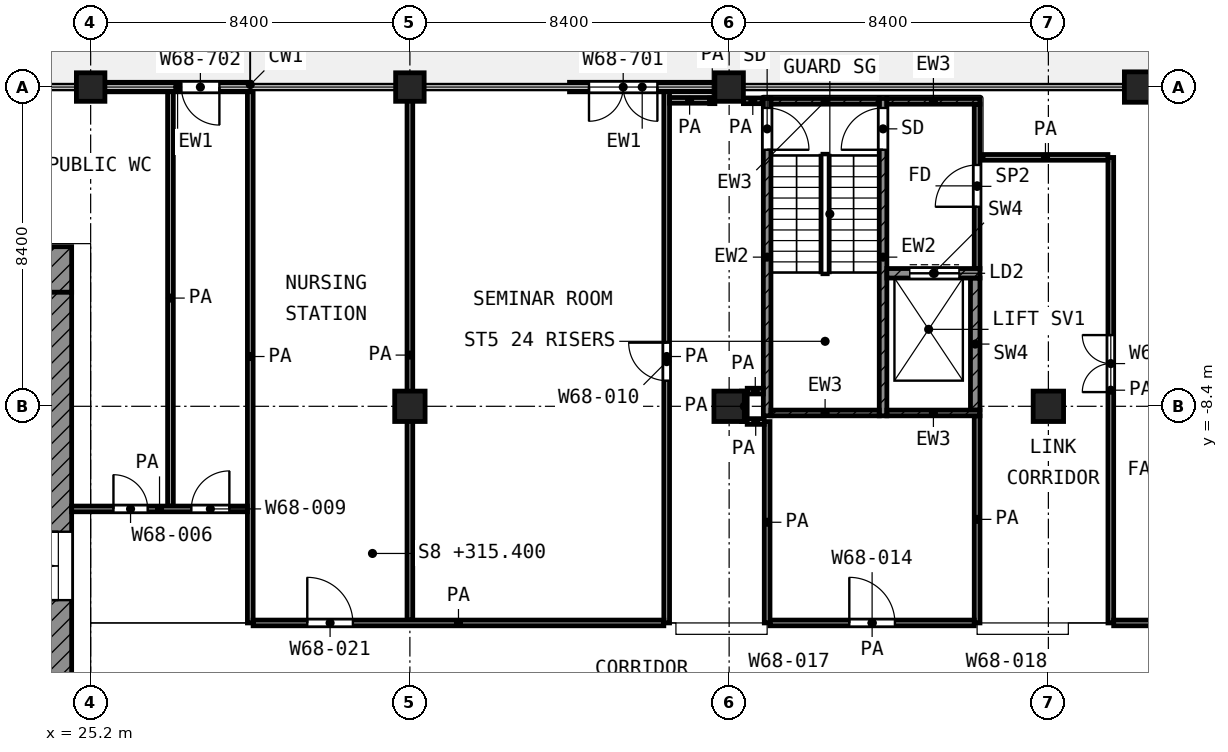
"""IFC4 building model, lengths in metres.
Left out: names, types, materials, properties, quantities, classifications, styles, units other than length and angle.
Written with IfcOpenShell. Run it as: python <this file> out.ifc"""

import sys

from ifc_helpers import new_model, si_unit, direction, frame, frame_2d, origin, origin_2d, place, context, subcontext, project, spatial, rectangle, extrude, element, fill, save


model = new_model("IFC4")
c1 = context("Model", 3, precision=1e-05, world=origin(), true_north=direction((0.0, 1.0)))
c2 = subcontext(c1, "Body", "Model", "MODEL_VIEW")
j1 = project(units=[si_unit("LENGTHUNIT", "METRE"), si_unit("PLANEANGLEUNIT", "RADIAN")], contexts=[c1])
p1 = place(None, origin())
s1 = spatial("IfcSite", under=j1, at=p1, CompositionType="ELEMENT")
p2 = place(p1, origin())
s2 = spatial("IfcBuilding", under=s1, at=p2, CompositionType="ELEMENT")
p3 = place(p2, frame((0.0, 0.0, 315.4)))
s3 = spatial("IfcBuildingStorey", under=s2, at=p3, CompositionType="ELEMENT", Elevation=315.4)
for number, where, z_axis, x_axis in (
    (1, (25.2, 0.0, 0.0), (0.0, 0.0, 1.0), (1.0, 0.0, 0.0)),
    (2, (33.6, 0.0, 0.0), (0.0, 0.0, 1.0), (1.0, 0.0, 0.0)),
    (3, (42.0, 0.0, 0.0), (0.0, 0.0, 1.0), (1.0, 0.0, 0.0)),
):
    element("IfcColumn", number, at=place(p3, frame(where, z_axis=z_axis, x_axis=x_axis)), inside=s3, PredefinedType="COLUMN", context=c2, shape_type="SweptSolid", body=[
        extrude(rectangle(XDim=0.75, YDim=0.75, at=origin_2d()), origin(), (0.0, 0.0, 1.0), 4.2),
    ])
for number, where, z_axis, x_axis in (
    (4, (52.8, 0.0, 0.0), (0.0, 0.0, 1.0), (1.0, 0.0, 0.0)),
    (5, (33.6, -8.4, 0.0), (0.0, 0.0, 1.0), (1.0, 0.0, 0.0)),
    (6, (42.0, -8.4, 0.0), (0.0, 0.0, 1.0), (1.0, 0.0, 0.0)),
    (7, (50.4, -8.4, 0.0), (0.0, 0.0, 1.0), (1.0, 0.0, 0.0)),
):
    element("IfcColumn", number, at=place(p3, frame(where, z_axis=z_axis, x_axis=x_axis)), inside=s3, PredefinedType="COLUMN", context=c2, shape_type="SweptSolid", body=[
        extrude(rectangle(XDim=0.8, YDim=0.8, at=origin_2d()), origin(), (0.0, 0.0, 1.0), 4.2),
    ])
p4 = place(p3, frame((41.625, 0.0, 0.0), z_axis=(0.0, 0.0, 1.0), x_axis=(-1.0, 0.0, 0.0)))
e8 = element("IfcWall", 8, at=p4, inside=s3, PredefinedType="SOLIDWALL", context=c2, shape_type="SweptSolid", body=[
    extrude(rectangle(XDim=3.825, YDim=0.25, at=frame_2d((1.913, 0.0))), origin(), (0.0, 0.0, 1.0), 3.48),
])
p5 = place(p4, frame((1.512, 0.0, 0.0)))
e9 = element("IfcOpeningElement", 9, at=p5, cuts=e8, PredefinedType="OPENING", context=c2, shape_type="SweptSolid", body=[
    extrude(rectangle(XDim=1.8, YDim=2.1, at=frame_2d((0.9, 1.05))), frame((0.0, 0.135, 0.0), z_axis=(0.0, -1.0, 0.0), x_axis=(1.0, 0.0, 0.0)), (0.0, 0.0, 1.0), 0.27),
])
p6 = place(p3, frame((29.4, 0.0, 0.0), z_axis=(0.0, 0.0, 1.0), x_axis=(-1.0, 0.0, 0.0)))
e10 = element("IfcWall", 10, at=p6, inside=s3, PredefinedType="SOLIDWALL", context=c2, shape_type="SweptSolid", body=[
    extrude(rectangle(XDim=3.825, YDim=0.25, at=frame_2d((1.913, 0.0))), origin(), (0.0, 0.0, 1.0), 3.48),
])
p7 = place(p6, frame((0.812, 0.0, 0.0)))
e11 = element("IfcOpeningElement", 11, at=p7, cuts=e10, PredefinedType="OPENING", context=c2, shape_type="SweptSolid", body=[
    extrude(rectangle(XDim=1.0, YDim=2.1, at=frame_2d((0.5, 1.05))), frame((0.0, 0.135, 0.0), z_axis=(0.0, -1.0, 0.0), x_axis=(1.0, 0.0, 0.0)), (0.0, 0.0, 1.0), 0.27),
])
p8 = place(p3, frame((4.2, -4.8, 0.0), z_axis=(0.0, 0.0, 1.0), x_axis=(1.0, 0.0, 0.0)))
e12 = element("IfcWall", 12, at=p8, inside=s3, PredefinedType="SHEAR", context=c2, shape_type="SweptSolid", body=[
    extrude(rectangle(XDim=20.5, YDim=1.2, at=frame_2d((10.25, 0.0))), origin(), (0.0, 0.0, 1.0), 3.6),
])
p9 = place(p8, frame((1.95, 0.0, 0.0)))
e13 = element("IfcOpeningElement", 13, at=p9, cuts=e12, PredefinedType="OPENING", context=c2, shape_type="SweptSolid", body=[
    extrude(rectangle(XDim=1.1, YDim=2.1, at=frame_2d((0.55, 1.05))), frame((0.0, 0.61, 0.0), z_axis=(0.0, -1.0, 0.0), x_axis=(1.0, 0.0, 0.0)), (0.0, 0.0, 1.0), 1.22),
])
p10 = place(p8, frame((17.95, 0.0, 0.0)))
e14 = element("IfcOpeningElement", 14, at=p10, cuts=e12, PredefinedType="OPENING", context=c2, shape_type="SweptSolid", body=[
    extrude(rectangle(XDim=1.1, YDim=2.1, at=frame_2d((0.55, 1.05))), frame((0.0, 0.61, 0.0), z_axis=(0.0, -1.0, 0.0), x_axis=(1.0, 0.0, 0.0)), (0.0, 0.0, 1.0), 1.22),
])
p11 = place(p3, frame((24.35, -24.0, 0.0), z_axis=(0.0, 0.0, 1.0), x_axis=(0.0, 1.0, 0.0)))
e15 = element("IfcWall", 15, at=p11, inside=s3, PredefinedType="SHEAR", context=c2, shape_type="SweptSolid", body=[
    extrude(rectangle(XDim=18.6, YDim=0.7, at=frame_2d((9.3, 0.0))), origin(), (0.0, 0.0, 1.0), 3.6),
])
p12 = place(p11, frame((10.5, 0.0, 0.0)))
e16 = element("IfcOpeningElement", 16, at=p12, cuts=e15, PredefinedType="OPENING", context=c2, shape_type="SweptSolid", body=[
    extrude(rectangle(XDim=1.8, YDim=2.1, at=frame_2d((0.9, 1.05))), frame((0.0, 0.36, 0.0), z_axis=(0.0, -1.0, 0.0), x_axis=(1.0, 0.0, 0.0)), (0.0, 0.0, 1.0), 0.72),
])
p13 = place(p3, frame((43.0, -8.65, 0.0), z_axis=(0.0, 0.0, 1.0), x_axis=(0.0, 1.0, 0.0)))
e17 = element("IfcWall", 17, at=p13, inside=s3, PredefinedType="SHEAR", context=c2, shape_type="SweptSolid", body=[
    extrude(rectangle(XDim=8.35, YDim=0.2, at=frame_2d((4.175, 0.0))), origin(), (0.0, 0.0, 1.0), 3.6),
])
p14 = place(p13, frame((7.0, 0.0, 0.0)))
e18 = element("IfcOpeningElement", 18, at=p14, cuts=e17, PredefinedType="OPENING", context=c2, shape_type="SweptSolid", body=[
    extrude(rectangle(XDim=1.1, YDim=2.1, at=frame_2d((0.55, 1.05))), frame((0.0, 0.11, 0.0), z_axis=(0.0, -1.0, 0.0), x_axis=(1.0, 0.0, 0.0)), (0.0, 0.0, 1.0), 0.22),
])
p15 = place(p3, frame((46.05, -8.65, 0.0), z_axis=(0.0, 0.0, 1.0), x_axis=(0.0, 1.0, 0.0)))
e19 = element("IfcWall", 19, at=p15, inside=s3, PredefinedType="SHEAR", context=c2, shape_type="SweptSolid", body=[
    extrude(rectangle(XDim=8.35, YDim=0.2, at=frame_2d((4.175, 0.0))), origin(), (0.0, 0.0, 1.0), 3.6),
])
p16 = place(p15, frame((7.0, 0.0, 0.0)))
e20 = element("IfcOpeningElement", 20, at=p16, cuts=e19, PredefinedType="OPENING", context=c2, shape_type="SweptSolid", body=[
    extrude(rectangle(XDim=1.1, YDim=2.1, at=frame_2d((0.55, 1.05))), frame((0.0, 0.11, 0.0), z_axis=(0.0, -1.0, 0.0), x_axis=(1.0, 0.0, 0.0)), (0.0, 0.0, 1.0), 0.22),
])
p17 = place(p3, frame((43.1, -0.375, 0.0), z_axis=(0.0, 0.0, 1.0), x_axis=(1.0, 0.0, 0.0)))
e21 = element("IfcWall", 21, at=p17, inside=s3, PredefinedType="SHEAR", context=c2, shape_type="SweptSolid", body=[
    extrude(rectangle(XDim=2.85, YDim=0.15, at=frame_2d((1.425, 0.0))), origin(), (0.0, 0.0, 1.0), 3.6),
])
p18 = place(p3, frame((46.15, -0.375, 0.0), z_axis=(0.0, 0.0, 1.0), x_axis=(1.0, 0.0, 0.0)))
e22 = element("IfcWall", 22, at=p18, inside=s3, PredefinedType="SHEAR", context=c2, shape_type="SweptSolid", body=[
    extrude(rectangle(XDim=2.45, YDim=0.15, at=frame_2d((1.225, 0.0))), origin(), (0.0, 0.0, 1.0), 3.6),
])
p19 = place(p3, frame((43.1, -8.575, 0.0), z_axis=(0.0, 0.0, 1.0), x_axis=(1.0, 0.0, 0.0)))
e23 = element("IfcWall", 23, at=p19, inside=s3, PredefinedType="SHEAR", context=c2, shape_type="SweptSolid", body=[
    extrude(rectangle(XDim=2.85, YDim=0.15, at=frame_2d((1.425, 0.0))), origin(), (0.0, 0.0, 1.0), 3.6),
])
p20 = place(p3, frame((46.15, -8.575, 0.0), z_axis=(0.0, 0.0, 1.0), x_axis=(1.0, 0.0, 0.0)))
e24 = element("IfcWall", 24, at=p20, inside=s3, PredefinedType="SHEAR", context=c2, shape_type="SweptSolid", body=[
    extrude(rectangle(XDim=2.45, YDim=0.15, at=frame_2d((1.225, 0.0))), origin(), (0.0, 0.0, 1.0), 3.6),
])
p21 = place(p3, frame((46.15, -4.9, 0.0), z_axis=(0.0, 0.0, 1.0), x_axis=(1.0, 0.0, 0.0)))
e25 = element("IfcWall", 25, at=p21, inside=s3, PredefinedType="SHEAR", context=c2, shape_type="SweptSolid", body=[
    extrude(rectangle(XDim=2.45, YDim=0.25, at=frame_2d((1.225, 0.0))), origin(), (0.0, 0.0, 1.0), 3.6),
])
p22 = place(p21, frame((0.6, 0.0, 0.0)))
e26 = element("IfcOpeningElement", 26, at=p22, cuts=e25, PredefinedType="OPENING", context=c2, shape_type="SweptSolid", body=[
    extrude(rectangle(XDim=1.3, YDim=2.1, at=frame_2d((0.65, 1.05))), frame((0.0, 0.135, 0.0), z_axis=(0.0, -1.0, 0.0), x_axis=(1.0, 0.0, 0.0)), (0.0, 0.0, 1.0), 0.27),
])
p23 = place(p3, frame((48.475, -8.5, 0.0), z_axis=(0.0, 0.0, 1.0), x_axis=(0.0, 1.0, 0.0)))
e27 = element("IfcWall", 27, at=p23, inside=s3, PredefinedType="SHEAR", context=c2, shape_type="SweptSolid", body=[
    extrude(rectangle(XDim=3.475, YDim=0.25, at=frame_2d((1.738, 0.0))), origin(), (0.0, 0.0, 1.0), 3.6),
])
p24 = place(p3, frame((48.525, -4.775, 0.0), z_axis=(0.0, 0.0, 1.0), x_axis=(0.0, 1.0, 0.0)))
e28 = element("IfcWall", 28, at=p24, inside=s3, PredefinedType="PARTITIONING", context=c2, shape_type="SweptSolid", body=[
    extrude(rectangle(XDim=4.325, YDim=0.15, at=frame_2d((2.163, 0.0))), origin(), (0.0, 0.0, 1.0), 3.6),
])
p25 = place(p24, frame((1.625, 0.0, 0.0)))
e29 = element("IfcOpeningElement", 29, at=p25, cuts=e28, PredefinedType="OPENING", context=c2, shape_type="SweptSolid", body=[
    extrude(rectangle(XDim=1.1, YDim=2.1, at=frame_2d((0.55, 1.05))), frame((0.0, 0.085, 0.0), z_axis=(0.0, -1.0, 0.0), x_axis=(1.0, 0.0, 0.0)), (0.0, 0.0, 1.0), 0.17),
])
p26 = place(p3, frame((29.475, -14.1, 0.0), z_axis=(0.0, 0.0, 1.0), x_axis=(1.0, 0.0, 0.0)))
e30 = element("IfcWall", 30, at=p26, inside=s3, PredefinedType="PARTITIONING", context=c2, shape_type="SweptSolid", body=[
    extrude(rectangle(XDim=10.807, YDim=0.15, at=frame_2d((5.403, 0.0))), origin(), (0.0, 0.0, 1.0), 3.6),
])
p27 = place(p26, frame((1.425, 0.0, 0.0)))
e31 = element("IfcOpeningElement", 31, at=p27, cuts=e30, PredefinedType="OPENING", context=c2, shape_type="SweptSolid", body=[
    extrude(rectangle(XDim=1.2, YDim=2.1, at=frame_2d((0.6, 1.05))), frame((0.0, 0.085, 0.0), z_axis=(0.0, -1.0, 0.0), x_axis=(1.0, 0.0, 0.0)), (0.0, 0.0, 1.0), 0.17),
])
p28 = place(p3, frame((43.075, -14.1, 0.0), z_axis=(0.0, 0.0, 1.0), x_axis=(1.0, 0.0, 0.0)))
e32 = element("IfcWall", 32, at=p28, inside=s3, PredefinedType="PARTITIONING", context=c2, shape_type="SweptSolid", body=[
    extrude(rectangle(XDim=5.375, YDim=0.15, at=frame_2d((2.688, 0.0))), origin(), (0.0, 0.0, 1.0), 3.6),
])
p29 = place(p28, frame((2.087, 0.0, 0.0)))
e33 = element("IfcOpeningElement", 33, at=p29, cuts=e32, PredefinedType="OPENING", context=c2, shape_type="SweptSolid", body=[
    extrude(rectangle(XDim=1.2, YDim=2.1, at=frame_2d((0.6, 1.05))), frame((0.0, 0.085, 0.0), z_axis=(0.0, -1.0, 0.0), x_axis=(1.0, 0.0, 0.0)), (0.0, 0.0, 1.0), 0.17),
])
p30 = place(p3, frame((52.118, -14.1, 0.0), z_axis=(0.0, 0.0, 1.0), x_axis=(1.0, 0.0, 0.0)))
e34 = element("IfcWall", 34, at=p30, inside=s3, PredefinedType="PARTITIONING", context=c2, shape_type="SweptSolid", body=[
    extrude(rectangle(XDim=6.602, YDim=0.15, at=frame_2d((3.301, 0.0))), origin(), (0.0, 0.0, 1.0), 3.6),
])
p31 = place(p3, frame((24.7, -11.1, 0.0), z_axis=(0.0, 0.0, 1.0), x_axis=(1.0, 0.0, 0.0)))
e35 = element("IfcWall", 35, at=p31, inside=s3, PredefinedType="PARTITIONING", context=c2, shape_type="SweptSolid", body=[
    extrude(rectangle(XDim=4.625, YDim=0.15, at=frame_2d((2.312, 0.0))), origin(), (0.0, 0.0, 1.0), 3.6),
])
p32 = place(p31, frame((1.1, 0.0, 0.0)))
e36 = element("IfcOpeningElement", 36, at=p32, cuts=e35, PredefinedType="OPENING", context=c2, shape_type="SweptSolid", body=[
    extrude(rectangle(XDim=0.9, YDim=2.1, at=frame_2d((0.45, 1.05))), frame((0.0, 0.085, 0.0), z_axis=(0.0, -1.0, 0.0), x_axis=(1.0, 0.0, 0.0)), (0.0, 0.0, 1.0), 0.17),
])
p33 = place(p31, frame((3.15, 0.0, 0.0)))
e37 = element("IfcOpeningElement", 37, at=p33, cuts=e35, PredefinedType="OPENING", context=c2, shape_type="SweptSolid", body=[
    extrude(rectangle(XDim=1.0, YDim=2.1, at=frame_2d((0.5, 1.05))), frame((0.0, 0.085, 0.0), z_axis=(0.0, -1.0, 0.0), x_axis=(1.0, 0.0, 0.0)), (0.0, 0.0, 1.0), 0.17),
])
p34 = place(p3, frame((42.475, -8.8, 0.0), z_axis=(0.0, 0.0, 1.0), x_axis=(1.0, 0.0, 0.0)))
e38 = element("IfcWall", 38, at=p34, inside=s3, PredefinedType="PARTITIONING", context=c2, shape_type="SweptSolid", body=[
    extrude(rectangle(XDim=0.448, YDim=0.15, at=frame_2d((0.224, 0.0))), origin(), (0.0, 0.0, 1.0), 3.6),
])
p35 = place(p3, frame((42.476, -8.0, 0.0), z_axis=(0.0, 0.0, 1.0), x_axis=(1.0, 0.0, 0.0)))
e39 = element("IfcWall", 39, at=p35, inside=s3, PredefinedType="PARTITIONING", context=c2, shape_type="SweptSolid", body=[
    extrude(rectangle(XDim=0.424, YDim=0.15, at=frame_2d((0.212, 0.0))), origin(), (0.0, 0.0, 1.0), 3.6),
])
p36 = place(p3, frame((48.68, -1.85, 0.0), z_axis=(0.0, 0.0, 1.0), x_axis=(1.0, 0.0, 0.0)))
e40 = element("IfcWall", 40, at=p36, inside=s3, PredefinedType="PARTITIONING", context=c2, shape_type="SweptSolid", body=[
    extrude(rectangle(XDim=3.287, YDim=0.15, at=frame_2d((1.644, 0.0))), origin(), (0.0, 0.0, 1.0), 3.6),
])
p37 = place(p3, frame((41.488, -0.362, 0.0), z_axis=(0.0, 0.0, 1.0), x_axis=(1.0, 0.0, 0.0)))
e41 = element("IfcWall", 41, at=p37, inside=s3, PredefinedType="PARTITIONING", context=c2, shape_type="SweptSolid", body=[
    extrude(rectangle(XDim=0.137, YDim=0.15, at=frame_2d((0.068, 0.0))), origin(), (0.0, 0.0, 1.0), 3.6),
])
p38 = place(p3, frame((42.375, -0.362, 0.0), z_axis=(0.0, 0.0, 1.0), x_axis=(1.0, 0.0, 0.0)))
e42 = element("IfcWall", 42, at=p38, inside=s3, PredefinedType="PARTITIONING", context=c2, shape_type="SweptSolid", body=[
    extrude(rectangle(XDim=0.495, YDim=0.15, at=frame_2d((0.248, 0.0))), origin(), (0.0, 0.0, 1.0), 3.6),
])
p39 = place(p3, frame((40.432, -0.35, 0.0), z_axis=(0.0, 0.0, 1.0), x_axis=(1.0, 0.0, 0.0)))
e43 = element("IfcWall", 43, at=p39, inside=s3, PredefinedType="PARTITIONING", context=c2, shape_type="SweptSolid", body=[
    extrude(rectangle(XDim=1.056, YDim=0.15, at=frame_2d((0.528, 0.0))), origin(), (0.0, 0.0, 1.0), 3.6),
])
p40 = place(p3, frame((27.3, -11.025, 0.0), z_axis=(0.0, 0.0, 1.0), x_axis=(0.0, 1.0, 0.0)))
e44 = element("IfcWall", 44, at=p40, inside=s3, PredefinedType="PARTITIONING", context=c2, shape_type="SweptSolid", body=[
    extrude(rectangle(XDim=10.945, YDim=0.15, at=frame_2d((5.472, 0.0))), origin(), (0.0, 0.0, 1.0), 3.6),
])
p41 = place(p3, frame((29.4, -14.1, 0.0), z_axis=(0.0, 0.0, 1.0), x_axis=(0.0, 1.0, 0.0)))
e45 = element("IfcWall", 45, at=p41, inside=s3, PredefinedType="PARTITIONING", context=c2, shape_type="SweptSolid", body=[
    extrude(rectangle(XDim=14.02, YDim=0.15, at=frame_2d((7.01, 0.0))), origin(), (0.0, 0.0, 1.0), 3.6),
])
p42 = place(p3, frame((33.6, -14.025, 0.0), z_axis=(0.0, 0.0, 1.0), x_axis=(0.0, 1.0, 0.0)))
e46 = element("IfcWall", 46, at=p42, inside=s3, PredefinedType="PARTITIONING", context=c2, shape_type="SweptSolid", body=[
    extrude(rectangle(XDim=13.945, YDim=0.15, at=frame_2d((6.972, 0.0))), origin(), (0.0, 0.0, 1.0), 3.6),
])
p43 = place(p3, frame((40.357, -14.1, 0.0), z_axis=(0.0, 0.0, 1.0), x_axis=(0.0, 1.0, 0.0)))
e47 = element("IfcWall", 47, at=p43, inside=s3, PredefinedType="PARTITIONING", context=c2, shape_type="SweptSolid", body=[
    extrude(rectangle(XDim=14.02, YDim=0.15, at=frame_2d((7.01, 0.0))), origin(), (0.0, 0.0, 1.0), 3.6),
])
p44 = place(p43, frame((6.375, 0.0, 0.0)))
e48 = element("IfcOpeningElement", 48, at=p44, cuts=e47, PredefinedType="OPENING", context=c2, shape_type="SweptSolid", body=[
    extrude(rectangle(XDim=1.0, YDim=2.1, at=frame_2d((0.5, 1.05))), frame((0.0, 0.085, 0.0), z_axis=(0.0, -1.0, 0.0), x_axis=(1.0, 0.0, 0.0)), (0.0, 0.0, 1.0), 0.17),
])
p45 = place(p3, frame((42.4, -8.8, 0.0), z_axis=(0.0, 0.0, 1.0), x_axis=(0.0, 1.0, 0.0)))
e49 = element("IfcWall", 49, at=p45, inside=s3, PredefinedType="PARTITIONING", context=c2, shape_type="SweptSolid", body=[
    extrude(rectangle(XDim=0.799, YDim=0.15, at=frame_2d((0.399, 0.0))), origin(), (0.0, 0.0, 1.0), 3.6),
])
p46 = place(p3, frame((43.0, -14.1, 0.0), z_axis=(0.0, 0.0, 1.0), x_axis=(0.0, 1.0, 0.0)))
e50 = element("IfcWall", 50, at=p46, inside=s3, PredefinedType="PARTITIONING", context=c2, shape_type="SweptSolid", body=[
    extrude(rectangle(XDim=5.298, YDim=0.15, at=frame_2d((2.649, 0.0))), origin(), (0.0, 0.0, 1.0), 3.6),
])
p47 = place(p3, frame((48.525, -14.1, 0.0), z_axis=(0.0, 0.0, 1.0), x_axis=(0.0, 1.0, 0.0)))
e51 = element("IfcWall", 51, at=p47, inside=s3, PredefinedType="PARTITIONING", context=c2, shape_type="SweptSolid", body=[
    extrude(rectangle(XDim=5.45, YDim=0.15, at=frame_2d((2.725, 0.0))), origin(), (0.0, 0.0, 1.0), 3.6),
])
p48 = place(p3, frame((52.043, -14.1, 0.0), z_axis=(0.0, 0.0, 1.0), x_axis=(0.0, 1.0, 0.0)))
e52 = element("IfcWall", 52, at=p48, inside=s3, PredefinedType="PARTITIONING", context=c2, shape_type="SweptSolid", body=[
    extrude(rectangle(XDim=12.248, YDim=0.15, at=frame_2d((6.124, 0.0))), origin(), (0.0, 0.0, 1.0), 3.6),
])
p49 = place(p48, frame((6.074, 0.0, 0.0)))
e53 = element("IfcOpeningElement", 53, at=p49, cuts=e52, PredefinedType="OPENING", context=c2, shape_type="SweptSolid", body=[
    extrude(rectangle(XDim=1.5, YDim=2.1, at=frame_2d((0.75, 1.05))), frame((0.0, 0.085, 0.0), z_axis=(0.0, -1.0, 0.0), x_axis=(1.0, 0.0, 0.0)), (0.0, 0.0, 1.0), 0.17),
])
p50 = place(p5, origin())
e54 = element("IfcDoor", 54, at=p50, inside=s3, OperationType="DOUBLE_DOOR_SINGLE_SWING", PredefinedType="DOOR", context=c2, shape_type="SweptSolid", body=[
    extrude(rectangle(XDim=1.8, YDim=2.1, at=frame_2d((0.9, 1.05))), frame((0.0, 0.025, 0.0), z_axis=(0.0, -1.0, 0.0), x_axis=(1.0, 0.0, 0.0)), (0.0, 0.0, 1.0), 0.05),
])
fill(e9, e54)
p51 = place(p7, origin())
e55 = element("IfcDoor", 55, at=p51, inside=s3, OperationType="SINGLE_SWING_LEFT", PredefinedType="DOOR", context=c2, shape_type="SweptSolid", body=[
    extrude(rectangle(XDim=1.0, YDim=2.1, at=frame_2d((0.5, 1.05))), frame((0.0, 0.025, 0.0), z_axis=(0.0, -1.0, 0.0), x_axis=(1.0, 0.0, 0.0)), (0.0, 0.0, 1.0), 0.05),
])
fill(e11, e55)
p52 = place(p12, origin())
e56 = element("IfcDoor", 56, at=p52, inside=s3, OperationType="DOUBLE_DOOR_SINGLE_SWING", PredefinedType="DOOR", context=c2, shape_type="SweptSolid", body=[
    extrude(rectangle(XDim=1.8, YDim=2.1, at=frame_2d((0.9, 1.05))), frame((0.0, 0.025, 0.0), z_axis=(0.0, -1.0, 0.0), x_axis=(1.0, 0.0, 0.0)), (0.0, 0.0, 1.0), 0.05),
])
fill(e16, e56)
p53 = place(p14, frame((1.1, 0.0, 0.0), z_axis=(0.0, 0.0, 1.0), x_axis=(-1.0, 0.0, 0.0)))
e57 = element("IfcDoor", 57, at=p53, inside=s3, OperationType="SINGLE_SWING_LEFT", PredefinedType="DOOR", context=c2, shape_type="SweptSolid", body=[
    extrude(rectangle(XDim=1.1, YDim=2.1, at=frame_2d((0.55, 1.05))), frame((0.0, 0.025, 0.0), z_axis=(0.0, -1.0, 0.0), x_axis=(1.0, 0.0, 0.0)), (0.0, 0.0, 1.0), 0.05),
])
fill(e18, e57)
p54 = place(p16, origin())
e58 = element("IfcDoor", 58, at=p54, inside=s3, OperationType="SINGLE_SWING_LEFT", PredefinedType="DOOR", context=c2, shape_type="SweptSolid", body=[
    extrude(rectangle(XDim=1.1, YDim=2.1, at=frame_2d((0.55, 1.05))), frame((0.0, 0.025, 0.0), z_axis=(0.0, -1.0, 0.0), x_axis=(1.0, 0.0, 0.0)), (0.0, 0.0, 1.0), 0.05),
])
fill(e20, e58)
p55 = place(p22, origin())
e59 = element("IfcDoor", 59, at=p55, inside=s3, OperationType="DOUBLE_DOOR_SLIDING", PredefinedType="DOOR", context=c2, shape_type="SweptSolid", body=[
    extrude(rectangle(XDim=1.3, YDim=2.1, at=frame_2d((0.65, 1.05))), frame((0.0, 0.025, 0.0), z_axis=(0.0, -1.0, 0.0), x_axis=(1.0, 0.0, 0.0)), (0.0, 0.0, 1.0), 0.05),
])
fill(e26, e59)
p56 = place(p25, origin())
e60 = element("IfcDoor", 60, at=p56, inside=s3, OperationType="SINGLE_SWING_LEFT", PredefinedType="DOOR", context=c2, shape_type="SweptSolid", body=[
    extrude(rectangle(XDim=1.1, YDim=2.1, at=frame_2d((0.55, 1.05))), frame((0.0, 0.025, 0.0), z_axis=(0.0, -1.0, 0.0), x_axis=(1.0, 0.0, 0.0)), (0.0, 0.0, 1.0), 0.05),
])
fill(e29, e60)
p57 = place(p44, origin())
e61 = element("IfcDoor", 61, at=p57, inside=s3, OperationType="SINGLE_SWING_RIGHT", PredefinedType="DOOR", context=c2, shape_type="SweptSolid", body=[
    extrude(rectangle(XDim=1.0, YDim=2.1, at=frame_2d((0.5, 1.05))), frame((0.0, 0.025, 0.0), z_axis=(0.0, -1.0, 0.0), x_axis=(1.0, 0.0, 0.0)), (0.0, 0.0, 1.0), 0.05),
])
fill(e48, e61)
p58 = place(p29, origin())
e62 = element("IfcDoor", 62, at=p58, inside=s3, OperationType="SINGLE_SWING_LEFT", PredefinedType="DOOR", context=c2, shape_type="SweptSolid", body=[
    extrude(rectangle(XDim=1.2, YDim=2.1, at=frame_2d((0.6, 1.05))), frame((0.0, 0.025, 0.0), z_axis=(0.0, -1.0, 0.0), x_axis=(1.0, 0.0, 0.0)), (0.0, 0.0, 1.0), 0.05),
])
fill(e33, e62)
p59 = place(p49, origin())
e63 = element("IfcDoor", 63, at=p59, inside=s3, OperationType="DOUBLE_DOOR_SINGLE_SWING", PredefinedType="DOOR", context=c2, shape_type="SweptSolid", body=[
    extrude(rectangle(XDim=1.5, YDim=2.1, at=frame_2d((0.75, 1.05))), frame((0.0, 0.025, 0.0), z_axis=(0.0, -1.0, 0.0), x_axis=(1.0, 0.0, 0.0)), (0.0, 0.0, 1.0), 0.05),
])
fill(e53, e63)
p60 = place(p32, origin())
e64 = element("IfcDoor", 64, at=p60, inside=s3, OperationType="SINGLE_SWING_LEFT", PredefinedType="DOOR", context=c2, shape_type="SweptSolid", body=[
    extrude(rectangle(XDim=0.9, YDim=2.1, at=frame_2d((0.45, 1.05))), frame((0.0, 0.025, 0.0), z_axis=(0.0, -1.0, 0.0), x_axis=(1.0, 0.0, 0.0)), (0.0, 0.0, 1.0), 0.05),
])
fill(e36, e64)
p61 = place(p33, origin())
e65 = element("IfcDoor", 65, at=p61, inside=s3, OperationType="SINGLE_SWING_RIGHT", PredefinedType="DOOR", context=c2, shape_type="SweptSolid", body=[
    extrude(rectangle(XDim=1.0, YDim=2.1, at=frame_2d((0.5, 1.05))), frame((0.0, 0.025, 0.0), z_axis=(0.0, -1.0, 0.0), x_axis=(1.0, 0.0, 0.0)), (0.0, 0.0, 1.0), 0.05),
])
fill(e37, e65)
p62 = place(p27, origin())
e66 = element("IfcDoor", 66, at=p62, inside=s3, OperationType="SINGLE_SWING_LEFT", PredefinedType="DOOR", context=c2, shape_type="SweptSolid", body=[
    extrude(rectangle(XDim=1.2, YDim=2.1, at=frame_2d((0.6, 1.05))), frame((0.0, 0.025, 0.0), z_axis=(0.0, -1.0, 0.0), x_axis=(1.0, 0.0, 0.0)), (0.0, 0.0, 1.0), 0.05),
])
fill(e31, e66)
save(model, sys.argv[1])
